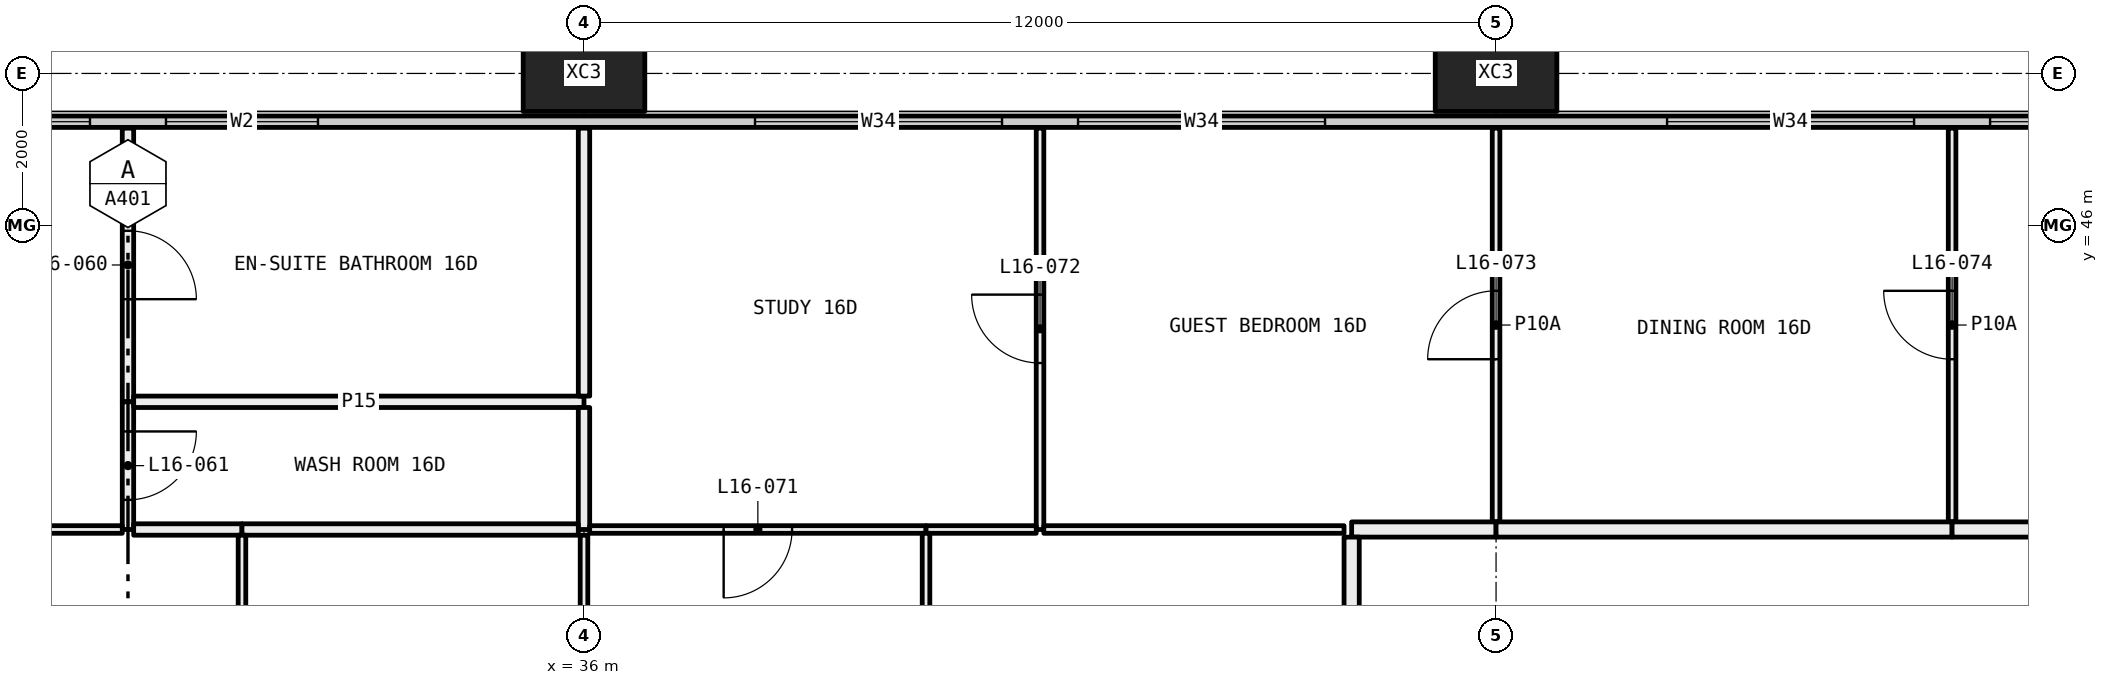
"""IFC4 building model, lengths in metres.
Left out: names, types, materials, properties, quantities, classifications, styles, units other than length and angle.
Written with IfcOpenShell. Run it as: python <this file> out.ifc"""

import sys

from ifc_helpers import new_model, si_unit, direction, frame, frame_2d, origin, origin_2d, place, context, subcontext, project, spatial, rectangle, hollow_rectangle, extrude, element, fill, save


model = new_model("IFC4")
c1 = context("Model", 3, precision=1e-05, world=origin(), true_north=direction((0.0, 1.0)))
c2 = subcontext(c1, "Body", "Model", "MODEL_VIEW")
j1 = project(units=[si_unit("LENGTHUNIT", "METRE"), si_unit("PLANEANGLEUNIT", "RADIAN")], contexts=[c1])
p1 = place(None, origin())
s1 = spatial("IfcSite", under=j1, at=p1, CompositionType="ELEMENT")
p2 = place(p1, origin())
s2 = spatial("IfcBuilding", under=s1, at=p2, CompositionType="ELEMENT")
p3 = place(p2, frame((0.0, 0.0, 67.95)))
s3 = spatial("IfcBuildingStorey", under=s2, at=p3, CompositionType="ELEMENT", Elevation=67.95)
for number, where, z_axis, x_axis in (
    (1, (36.0, 48.0, -0.4), (0.0, 0.0, 1.0), (1.0, 0.0, 0.0)),
    (2, (48.0, 48.0, -0.4), (0.0, 0.0, 1.0), (1.0, 0.0, 0.0)),
):
    element("IfcColumn", number, at=place(p3, frame(where, z_axis=z_axis, x_axis=x_axis)), inside=s3, PredefinedType="COLUMN", context=c2, shape_type="SweptSolid", body=[
        extrude(hollow_rectangle(XDim=1.6, YDim=1.0, WallThickness=0.065, at=origin_2d()), origin(), (0.0, 0.0, 1.0), 3.45),
    ])
p4 = place(p3, frame((6.56, 47.365, 0.0), z_axis=(0.0, 0.0, 1.0), x_axis=(1.0, 0.0, 0.0)))
e3 = element("IfcWall", 3, at=p4, inside=s3, PredefinedType="ELEMENTEDWALL", context=c2, shape_type="SweptSolid", body=[
    extrude(rectangle(XDim=58.88, YDim=0.15, at=frame_2d((29.44, 0.0))), origin(), (0.0, 0.0, 1.0), 3.05),
])
p5 = place(p4, frame((0.44, 0.0, 0.45)))
e4 = element("IfcOpeningElement", 4, at=p5, cuts=e3, PredefinedType="OPENING", context=c2, shape_type="SweptSolid", body=[
    extrude(rectangle(XDim=4.5, YDim=2.55, at=frame_2d((2.25, 1.275))), frame((0.0, 0.085, 0.0), z_axis=(0.0, -1.0, 0.0), x_axis=(1.0, 0.0, 0.0)), (0.0, 0.0, 1.0), 0.17),
])
p6 = place(p4, frame((7.69, 0.0, 0.45)))
e5 = element("IfcOpeningElement", 5, at=p6, cuts=e3, PredefinedType="OPENING", context=c2, shape_type="SweptSolid", body=[
    extrude(rectangle(XDim=3.25, YDim=2.55, at=frame_2d((1.625, 1.275))), frame((0.0, 0.085, 0.0), z_axis=(0.0, -1.0, 0.0), x_axis=(1.0, 0.0, 0.0)), (0.0, 0.0, 1.0), 0.17),
])
p7 = place(p4, frame((11.94, 0.0, 0.45)))
e6 = element("IfcOpeningElement", 6, at=p7, cuts=e3, PredefinedType="OPENING", context=c2, shape_type="SweptSolid", body=[
    extrude(rectangle(XDim=3.25, YDim=2.55, at=frame_2d((1.625, 1.275))), frame((0.0, 0.085, 0.0), z_axis=(0.0, -1.0, 0.0), x_axis=(1.0, 0.0, 0.0)), (0.0, 0.0, 1.0), 0.17),
])
p8 = place(p4, frame((19.69, 0.0, 0.45)))
e7 = element("IfcOpeningElement", 7, at=p8, cuts=e3, PredefinedType="OPENING", context=c2, shape_type="SweptSolid", body=[
    extrude(rectangle(XDim=3.25, YDim=2.55, at=frame_2d((1.625, 1.275))), frame((0.0, 0.085, 0.0), z_axis=(0.0, -1.0, 0.0), x_axis=(1.0, 0.0, 0.0)), (0.0, 0.0, 1.0), 0.17),
])
p9 = place(p4, frame((23.94, 0.0, 0.45)))
e8 = element("IfcOpeningElement", 8, at=p9, cuts=e3, PredefinedType="OPENING", context=c2, shape_type="SweptSolid", body=[
    extrude(rectangle(XDim=2.0, YDim=2.55, at=frame_2d((1.0, 1.275))), frame((0.0, 0.085, 0.0), z_axis=(0.0, -1.0, 0.0), x_axis=(1.0, 0.0, 0.0)), (0.0, 0.0, 1.0), 0.17),
])
p10 = place(p4, frame((31.69, 0.0, 0.45)))
e9 = element("IfcOpeningElement", 9, at=p10, cuts=e3, PredefinedType="OPENING", context=c2, shape_type="SweptSolid", body=[
    extrude(rectangle(XDim=3.25, YDim=2.55, at=frame_2d((1.625, 1.275))), frame((0.0, 0.085, 0.0), z_axis=(0.0, -1.0, 0.0), x_axis=(1.0, 0.0, 0.0)), (0.0, 0.0, 1.0), 0.17),
])
p11 = place(p4, frame((35.94, 0.0, 0.45)))
e10 = element("IfcOpeningElement", 10, at=p11, cuts=e3, PredefinedType="OPENING", context=c2, shape_type="SweptSolid", body=[
    extrude(rectangle(XDim=3.25, YDim=2.55, at=frame_2d((1.625, 1.275))), frame((0.0, 0.085, 0.0), z_axis=(0.0, -1.0, 0.0), x_axis=(1.0, 0.0, 0.0)), (0.0, 0.0, 1.0), 0.17),
])
p12 = place(p4, frame((43.69, 0.0, 0.45)))
e11 = element("IfcOpeningElement", 11, at=p12, cuts=e3, PredefinedType="OPENING", context=c2, shape_type="SweptSolid", body=[
    extrude(rectangle(XDim=3.25, YDim=2.55, at=frame_2d((1.625, 1.275))), frame((0.0, 0.085, 0.0), z_axis=(0.0, -1.0, 0.0), x_axis=(1.0, 0.0, 0.0)), (0.0, 0.0, 1.0), 0.17),
])
p13 = place(p4, frame((47.94, 0.0, 0.45)))
e12 = element("IfcOpeningElement", 12, at=p13, cuts=e3, PredefinedType="OPENING", context=c2, shape_type="SweptSolid", body=[
    extrude(rectangle(XDim=2.0, YDim=2.55, at=frame_2d((1.0, 1.275))), frame((0.0, 0.085, 0.0), z_axis=(0.0, -1.0, 0.0), x_axis=(1.0, 0.0, 0.0)), (0.0, 0.0, 1.0), 0.17),
])
p14 = place(p4, frame((53.94, 0.0, 0.45)))
e13 = element("IfcOpeningElement", 13, at=p14, cuts=e3, PredefinedType="OPENING", context=c2, shape_type="SweptSolid", body=[
    extrude(rectangle(XDim=4.5, YDim=2.55, at=frame_2d((2.25, 1.275))), frame((0.0, 0.085, 0.0), z_axis=(0.0, -1.0, 0.0), x_axis=(1.0, 0.0, 0.0)), (0.0, 0.0, 1.0), 0.17),
])
p15 = place(p3, frame((30.0, 43.68, 0.0), z_axis=(0.0, 0.0, 1.0), x_axis=(0.0, 1.0, 0.0)))
e14 = element("IfcWall", 14, at=p15, inside=s3, PredefinedType="PARTITIONING", context=c2, shape_type="SweptSolid", body=[
    extrude(rectangle(XDim=3.6, YDim=0.15, at=frame_2d((1.8, 0.0))), origin(), (0.0, 0.0, 1.0), 3.05),
])
p16 = place(p15, frame((1.35, 0.0, 0.0)))
e15 = element("IfcOpeningElement", 15, at=p16, cuts=e14, PredefinedType="OPENING", context=c2, shape_type="SweptSolid", body=[
    extrude(rectangle(XDim=0.9, YDim=2.1, at=frame_2d((0.45, 1.05))), frame((0.0, 0.085, 0.0), z_axis=(0.0, -1.0, 0.0), x_axis=(1.0, 0.0, 0.0)), (0.0, 0.0, 1.0), 0.17),
])
p17 = place(p3, frame((30.0, 42.0, 0.0), z_axis=(0.0, 0.0, 1.0), x_axis=(0.0, 1.0, 0.0)))
e16 = element("IfcWall", 16, at=p17, inside=s3, PredefinedType="PARTITIONING", context=c2, shape_type="SweptSolid", body=[
    extrude(rectangle(XDim=1.68, YDim=0.15, at=frame_2d((0.84, 0.0))), origin(), (0.0, 0.0, 1.0), 3.05),
])
p18 = place(p17, frame((0.39, 0.0, 0.0)))
e17 = element("IfcOpeningElement", 17, at=p18, cuts=e16, PredefinedType="OPENING", context=c2, shape_type="SweptSolid", body=[
    extrude(rectangle(XDim=0.9, YDim=2.1, at=frame_2d((0.45, 1.05))), frame((0.0, 0.085, 0.0), z_axis=(0.0, -1.0, 0.0), x_axis=(1.0, 0.0, 0.0)), (0.0, 0.0, 1.0), 0.17),
])
p19 = place(p3, frame((26.0, 42.0, 0.0), z_axis=(0.0, 0.0, 1.0), x_axis=(1.0, 0.0, 0.0)))
e18 = element("IfcWall", 18, at=p19, inside=s3, PredefinedType="PARTITIONING", context=c2, shape_type="SweptSolid", body=[
    extrude(rectangle(XDim=3.925, YDim=0.1, at=frame_2d((1.962, 0.0))), origin(), (0.0, 0.0, 1.0), 3.05),
])
p20 = place(p19, frame((1.512, 0.0, 0.0)))
e19 = element("IfcOpeningElement", 19, at=p20, cuts=e18, PredefinedType="OPENING", context=c2, shape_type="SweptSolid", body=[
    extrude(rectangle(XDim=0.9, YDim=2.1, at=frame_2d((0.45, 1.05))), frame((0.0, 0.06, 0.0), z_axis=(0.0, -1.0, 0.0), x_axis=(1.0, 0.0, 0.0)), (0.0, 0.0, 1.0), 0.12),
])
p21 = place(p3, frame((30.075, 43.68, 0.0), z_axis=(0.0, 0.0, 1.0), x_axis=(1.0, 0.0, 0.0)))
e20 = element("IfcWall", 20, at=p21, inside=s3, PredefinedType="PARTITIONING", context=c2, shape_type="SweptSolid", body=[
    extrude(rectangle(XDim=5.925, YDim=0.15, at=frame_2d((2.962, 0.0))), origin(), (0.0, 0.0, 1.0), 2.45),
])
p22 = place(p3, frame((36.0, 43.755, 0.0), z_axis=(0.0, 0.0, 1.0), x_axis=(0.0, 1.0, 0.0)))
e21 = element("IfcWall", 21, at=p22, inside=s3, PredefinedType="PARTITIONING", context=c2, shape_type="SweptSolid", body=[
    extrude(rectangle(XDim=3.525, YDim=0.15, at=frame_2d((1.763, 0.0))), origin(), (0.0, 0.0, 1.0), 2.45),
])
p23 = place(p3, frame((36.0, 42.0, 0.0), z_axis=(0.0, 0.0, 1.0), x_axis=(0.0, 1.0, 0.0)))
e22 = element("IfcWall", 22, at=p23, inside=s3, PredefinedType="PARTITIONING", context=c2, shape_type="SweptSolid", body=[
    extrude(rectangle(XDim=1.605, YDim=0.15, at=frame_2d((0.802, 0.0))), origin(), (0.0, 0.0, 1.0), 2.45),
])
p24 = place(p3, frame((30.075, 42.0, 0.0), z_axis=(0.0, 0.0, 1.0), x_axis=(1.0, 0.0, 0.0)))
e23 = element("IfcWall", 23, at=p24, inside=s3, PredefinedType="PARTITIONING", context=c2, shape_type="SweptSolid", body=[
    extrude(rectangle(XDim=1.425, YDim=0.15, at=frame_2d((0.712, 0.0))), origin(), (0.0, 0.0, 1.0), 3.05),
])
p25 = place(p3, frame((31.5, 42.0, 0.0), z_axis=(0.0, 0.0, 1.0), x_axis=(1.0, 0.0, 0.0)))
e24 = element("IfcWall", 24, at=p25, inside=s3, PredefinedType="PARTITIONING", context=c2, shape_type="SweptSolid", body=[
    extrude(rectangle(XDim=4.425, YDim=0.15, at=frame_2d((2.212, 0.0))), origin(), (0.0, 0.0, 1.0), 2.45),
])
p26 = place(p3, frame((42.0, 42.0, 0.0), z_axis=(0.0, 0.0, 1.0), x_axis=(0.0, 1.0, 0.0)))
e25 = element("IfcWall", 25, at=p26, inside=s3, PredefinedType="PARTITIONING", context=c2, shape_type="SweptSolid", body=[
    extrude(rectangle(XDim=5.28, YDim=0.1, at=frame_2d((2.64, 0.0))), origin(), (0.0, 0.0, 1.0), 3.05),
])
p27 = place(p26, frame((2.19, 0.0, 0.0)))
e26 = element("IfcOpeningElement", 26, at=p27, cuts=e25, PredefinedType="OPENING", context=c2, shape_type="SweptSolid", body=[
    extrude(rectangle(XDim=0.9, YDim=2.1, at=frame_2d((0.45, 1.05))), frame((0.0, 0.06, 0.0), z_axis=(0.0, -1.0, 0.0), x_axis=(1.0, 0.0, 0.0)), (0.0, 0.0, 1.0), 0.12),
])
p28 = place(p3, frame((36.075, 42.0, 0.0), z_axis=(0.0, 0.0, 1.0), x_axis=(1.0, 0.0, 0.0)))
e27 = element("IfcWall", 27, at=p28, inside=s3, PredefinedType="PARTITIONING", context=c2, shape_type="SweptSolid", body=[
    extrude(rectangle(XDim=4.425, YDim=0.1, at=frame_2d((2.212, 0.0))), origin(), (0.0, 0.0, 1.0), 2.45),
])
p29 = place(p28, frame((1.762, 0.0, 0.0)))
e28 = element("IfcOpeningElement", 28, at=p29, cuts=e27, PredefinedType="OPENING", context=c2, shape_type="SweptSolid", body=[
    extrude(rectangle(XDim=0.9, YDim=2.1, at=frame_2d((0.45, 1.05))), frame((0.0, 0.06, 0.0), z_axis=(0.0, -1.0, 0.0), x_axis=(1.0, 0.0, 0.0)), (0.0, 0.0, 1.0), 0.12),
])
p30 = place(p3, frame((40.5, 42.0, 0.0), z_axis=(0.0, 0.0, 1.0), x_axis=(1.0, 0.0, 0.0)))
e29 = element("IfcWall", 29, at=p30, inside=s3, PredefinedType="PARTITIONING", context=c2, shape_type="SweptSolid", body=[
    extrude(rectangle(XDim=1.45, YDim=0.1, at=frame_2d((0.725, 0.0))), origin(), (0.0, 0.0, 1.0), 3.05),
])
p31 = place(p3, frame((48.0, 42.1, 0.0), z_axis=(0.0, 0.0, 1.0), x_axis=(0.0, 1.0, 0.0)))
e30 = element("IfcWall", 30, at=p31, inside=s3, PredefinedType="PARTITIONING", context=c2, shape_type="SweptSolid", body=[
    extrude(rectangle(XDim=5.18, YDim=0.1, at=frame_2d((2.59, 0.0))), origin(), (0.0, 0.0, 1.0), 3.05),
])
p32 = place(p31, frame((2.14, 0.0, 0.0)))
e31 = element("IfcOpeningElement", 31, at=p32, cuts=e30, PredefinedType="OPENING", context=c2, shape_type="SweptSolid", body=[
    extrude(rectangle(XDim=0.9, YDim=2.1, at=frame_2d((0.45, 1.05))), frame((0.0, 0.06, 0.0), z_axis=(0.0, -1.0, 0.0), x_axis=(1.0, 0.0, 0.0)), (0.0, 0.0, 1.0), 0.12),
])
p33 = place(p3, frame((42.05, 42.0, 0.0), z_axis=(0.0, 0.0, 1.0), x_axis=(1.0, 0.0, 0.0)))
e32 = element("IfcWall", 32, at=p33, inside=s3, PredefinedType="PARTITIONING", context=c2, shape_type="SweptSolid", body=[
    extrude(rectangle(XDim=3.95, YDim=0.1, at=frame_2d((1.975, 0.0))), origin(), (0.0, 0.0, 1.0), 3.05),
])
p34 = place(p3, frame((46.1, 42.0, 0.0), z_axis=(0.0, 0.0, 1.0), x_axis=(1.0, 0.0, 0.0)))
e33 = element("IfcWall", 33, at=p34, inside=s3, PredefinedType="PARTITIONING", context=c2, shape_type="SweptSolid", body=[
    extrude(rectangle(XDim=1.9, YDim=0.2, at=frame_2d((0.95, 0.0))), origin(), (0.0, 0.0, 1.0), 3.05),
])
p35 = place(p3, frame((54.0, 42.1, 0.0), z_axis=(0.0, 0.0, 1.0), x_axis=(0.0, 1.0, 0.0)))
e34 = element("IfcWall", 34, at=p35, inside=s3, PredefinedType="PARTITIONING", context=c2, shape_type="SweptSolid", body=[
    extrude(rectangle(XDim=5.18, YDim=0.1, at=frame_2d((2.59, 0.0))), origin(), (0.0, 0.0, 1.0), 3.05),
])
p36 = place(p35, frame((2.14, 0.0, 0.0)))
e35 = element("IfcOpeningElement", 35, at=p36, cuts=e34, PredefinedType="OPENING", context=c2, shape_type="SweptSolid", body=[
    extrude(rectangle(XDim=0.9, YDim=2.1, at=frame_2d((0.45, 1.05))), frame((0.0, 0.06, 0.0), z_axis=(0.0, -1.0, 0.0), x_axis=(1.0, 0.0, 0.0)), (0.0, 0.0, 1.0), 0.12),
])
p37 = place(p3, frame((48.0, 42.0, 0.0), z_axis=(0.0, 0.0, 1.0), x_axis=(1.0, 0.0, 0.0)))
e36 = element("IfcWall", 36, at=p37, inside=s3, PredefinedType="PARTITIONING", context=c2, shape_type="SweptSolid", body=[
    extrude(rectangle(XDim=6.0, YDim=0.2, at=frame_2d((3.0, 0.0))), origin(), (0.0, 0.0, 1.0), 3.05),
])
p38 = place(p3, frame((54.0, 42.0, 0.0), z_axis=(0.0, 0.0, 1.0), x_axis=(1.0, 0.0, 0.0)))
e37 = element("IfcWall", 37, at=p38, inside=s3, PredefinedType="PARTITIONING", context=c2, shape_type="SweptSolid", body=[
    extrude(rectangle(XDim=7.9, YDim=0.2, at=frame_2d((3.95, 0.0))), origin(), (0.0, 0.0, 1.0), 3.05),
])
p39 = place(p3, frame((31.5, 36.1, 0.0), z_axis=(0.0, 0.0, 1.0), x_axis=(0.0, 1.0, 0.0)))
e38 = element("IfcWall", 38, at=p39, inside=s3, PredefinedType="PARTITIONING", context=c2, shape_type="SweptSolid", body=[
    extrude(rectangle(XDim=5.825, YDim=0.1, at=frame_2d((2.913, 0.0))), origin(), (0.0, 0.0, 1.0), 3.05),
])
p40 = place(p39, frame((2.462, 0.0, 0.0)))
e39 = element("IfcOpeningElement", 39, at=p40, cuts=e38, PredefinedType="OPENING", context=c2, shape_type="SweptSolid", body=[
    extrude(rectangle(XDim=0.9, YDim=2.1, at=frame_2d((0.45, 1.05))), frame((0.0, 0.06, 0.0), z_axis=(0.0, -1.0, 0.0), x_axis=(1.0, 0.0, 0.0)), (0.0, 0.0, 1.0), 0.12),
])
p41 = place(p3, frame((36.0, 36.8, 0.0), z_axis=(0.0, 0.0, 1.0), x_axis=(0.0, 1.0, 0.0)))
e40 = element("IfcWall", 40, at=p41, inside=s3, PredefinedType="PARTITIONING", context=c2, shape_type="SweptSolid", body=[
    extrude(rectangle(XDim=5.125, YDim=0.1, at=frame_2d((2.562, 0.0))), origin(), (0.0, 0.0, 1.0), 2.45),
])
p42 = place(p41, frame((2.113, 0.0, 0.0)))
e41 = element("IfcOpeningElement", 41, at=p42, cuts=e40, PredefinedType="OPENING", context=c2, shape_type="SweptSolid", body=[
    extrude(rectangle(XDim=0.9, YDim=2.1, at=frame_2d((0.45, 1.05))), frame((0.0, 0.06, 0.0), z_axis=(0.0, -1.0, 0.0), x_axis=(1.0, 0.0, 0.0)), (0.0, 0.0, 1.0), 0.12),
])
p43 = place(p3, frame((40.5, 36.1, 0.0), z_axis=(0.0, 0.0, 1.0), x_axis=(0.0, 1.0, 0.0)))
e42 = element("IfcWall", 42, at=p43, inside=s3, PredefinedType="PARTITIONING", context=c2, shape_type="SweptSolid", body=[
    extrude(rectangle(XDim=5.85, YDim=0.1, at=frame_2d((2.925, 0.0))), origin(), (0.0, 0.0, 1.0), 3.05),
])
p44 = place(p43, frame((2.475, 0.0, 0.0)))
e43 = element("IfcOpeningElement", 43, at=p44, cuts=e42, PredefinedType="OPENING", context=c2, shape_type="SweptSolid", body=[
    extrude(rectangle(XDim=0.9, YDim=2.1, at=frame_2d((0.45, 1.05))), frame((0.0, 0.06, 0.0), z_axis=(0.0, -1.0, 0.0), x_axis=(1.0, 0.0, 0.0)), (0.0, 0.0, 1.0), 0.12),
])
p45 = place(p3, frame((46.1, 36.1, 0.0), z_axis=(0.0, 0.0, 1.0), x_axis=(0.0, 1.0, 0.0)))
e44 = element("IfcWall", 44, at=p45, inside=s3, PredefinedType="PARTITIONING", context=c2, shape_type="SweptSolid", body=[
    extrude(rectangle(XDim=5.8, YDim=0.2, at=frame_2d((2.9, 0.0))), origin(), (0.0, 0.0, 1.0), 3.05),
])
p46 = place(p8, origin())
e45 = element("IfcWindow", 45, at=p46, inside=s3, PartitioningType="SINGLE_PANEL", PredefinedType="WINDOW", context=c2, shape_type="SweptSolid", body=[
    extrude(rectangle(XDim=3.25, YDim=2.55, at=frame_2d((1.625, 1.275))), frame((0.0, 0.03, 0.0), z_axis=(0.0, -1.0, 0.0), x_axis=(1.0, 0.0, 0.0)), (0.0, 0.0, 1.0), 0.06),
])
fill(e7, e45)
p47 = place(p9, origin())
e46 = element("IfcWindow", 46, at=p47, inside=s3, PartitioningType="SINGLE_PANEL", PredefinedType="WINDOW", context=c2, shape_type="SweptSolid", body=[
    extrude(rectangle(XDim=2.0, YDim=2.55, at=frame_2d((1.0, 1.275))), frame((0.0, 0.03, 0.0), z_axis=(0.0, -1.0, 0.0), x_axis=(1.0, 0.0, 0.0)), (0.0, 0.0, 1.0), 0.06),
])
fill(e8, e46)
p48 = place(p10, origin())
e47 = element("IfcWindow", 47, at=p48, inside=s3, PartitioningType="SINGLE_PANEL", PredefinedType="WINDOW", context=c2, shape_type="SweptSolid", body=[
    extrude(rectangle(XDim=3.25, YDim=2.55, at=frame_2d((1.625, 1.275))), frame((0.0, 0.03, 0.0), z_axis=(0.0, -1.0, 0.0), x_axis=(1.0, 0.0, 0.0)), (0.0, 0.0, 1.0), 0.06),
])
fill(e9, e47)
p49 = place(p11, origin())
e48 = element("IfcWindow", 48, at=p49, inside=s3, PartitioningType="SINGLE_PANEL", PredefinedType="WINDOW", context=c2, shape_type="SweptSolid", body=[
    extrude(rectangle(XDim=3.25, YDim=2.55, at=frame_2d((1.625, 1.275))), frame((0.0, 0.03, 0.0), z_axis=(0.0, -1.0, 0.0), x_axis=(1.0, 0.0, 0.0)), (0.0, 0.0, 1.0), 0.06),
])
fill(e10, e48)
p50 = place(p12, origin())
e49 = element("IfcWindow", 49, at=p50, inside=s3, PartitioningType="SINGLE_PANEL", PredefinedType="WINDOW", context=c2, shape_type="SweptSolid", body=[
    extrude(rectangle(XDim=3.25, YDim=2.55, at=frame_2d((1.625, 1.275))), frame((0.0, 0.03, 0.0), z_axis=(0.0, -1.0, 0.0), x_axis=(1.0, 0.0, 0.0)), (0.0, 0.0, 1.0), 0.06),
])
fill(e11, e49)
p51 = place(p13, origin())
e50 = element("IfcWindow", 50, at=p51, inside=s3, PartitioningType="SINGLE_PANEL", PredefinedType="WINDOW", context=c2, shape_type="SweptSolid", body=[
    extrude(rectangle(XDim=2.0, YDim=2.55, at=frame_2d((1.0, 1.275))), frame((0.0, 0.03, 0.0), z_axis=(0.0, -1.0, 0.0), x_axis=(1.0, 0.0, 0.0)), (0.0, 0.0, 1.0), 0.06),
])
fill(e12, e50)
p52 = place(p16, frame((0.9, 0.0, 0.0), x_axis=(-1.0, 0.0, 0.0)))
e51 = element("IfcDoor", 51, at=p52, inside=s3, OperationType="SINGLE_SWING_LEFT", PredefinedType="DOOR", context=c2, shape_type="SweptSolid", body=[
    extrude(rectangle(XDim=0.9, YDim=2.1, at=frame_2d((0.45, 1.05))), frame((0.0, 0.025, 0.0), z_axis=(0.0, -1.0, 0.0), x_axis=(1.0, 0.0, 0.0)), (0.0, 0.0, 1.0), 0.05),
])
fill(e15, e51)
p53 = place(p18, frame((0.9, 0.0, 0.0), x_axis=(-1.0, 0.0, 0.0)))
e52 = element("IfcDoor", 52, at=p53, inside=s3, OperationType="SINGLE_SWING_RIGHT", PredefinedType="DOOR", context=c2, shape_type="SweptSolid", body=[
    extrude(rectangle(XDim=0.9, YDim=2.1, at=frame_2d((0.45, 1.05))), frame((0.0, 0.025, 0.0), z_axis=(0.0, -1.0, 0.0), x_axis=(1.0, 0.0, 0.0)), (0.0, 0.0, 1.0), 0.05),
])
fill(e17, e52)
p54 = place(p29, frame((0.9, 0.0, 0.0), x_axis=(-1.0, 0.0, 0.0)))
e53 = element("IfcDoor", 53, at=p54, inside=s3, OperationType="SINGLE_SWING_LEFT", PredefinedType="DOOR", context=c2, shape_type="SweptSolid", body=[
    extrude(rectangle(XDim=0.9, YDim=2.1, at=frame_2d((0.45, 1.05))), frame((0.0, 0.025, 0.0), z_axis=(0.0, -1.0, 0.0), x_axis=(1.0, 0.0, 0.0)), (0.0, 0.0, 1.0), 0.05),
])
fill(e28, e53)
p55 = place(p27, origin())
e54 = element("IfcDoor", 54, at=p55, inside=s3, OperationType="SINGLE_SWING_LEFT", PredefinedType="DOOR", context=c2, shape_type="SweptSolid", body=[
    extrude(rectangle(XDim=0.9, YDim=2.1, at=frame_2d((0.45, 1.05))), frame((0.0, 0.025, 0.0), z_axis=(0.0, -1.0, 0.0), x_axis=(1.0, 0.0, 0.0)), (0.0, 0.0, 1.0), 0.05),
])
fill(e26, e54)
p56 = place(p32, origin())
e55 = element("IfcDoor", 55, at=p56, inside=s3, OperationType="SINGLE_SWING_RIGHT", PredefinedType="DOOR", context=c2, shape_type="SweptSolid", body=[
    extrude(rectangle(XDim=0.9, YDim=2.1, at=frame_2d((0.45, 1.05))), frame((0.0, 0.025, 0.0), z_axis=(0.0, -1.0, 0.0), x_axis=(1.0, 0.0, 0.0)), (0.0, 0.0, 1.0), 0.05),
])
fill(e31, e55)
p57 = place(p36, origin())
e56 = element("IfcDoor", 56, at=p57, inside=s3, OperationType="SINGLE_SWING_LEFT", PredefinedType="DOOR", context=c2, shape_type="SweptSolid", body=[
    extrude(rectangle(XDim=0.9, YDim=2.1, at=frame_2d((0.45, 1.05))), frame((0.0, 0.025, 0.0), z_axis=(0.0, -1.0, 0.0), x_axis=(1.0, 0.0, 0.0)), (0.0, 0.0, 1.0), 0.05),
])
fill(e35, e56)
save(model, sys.argv[1])
